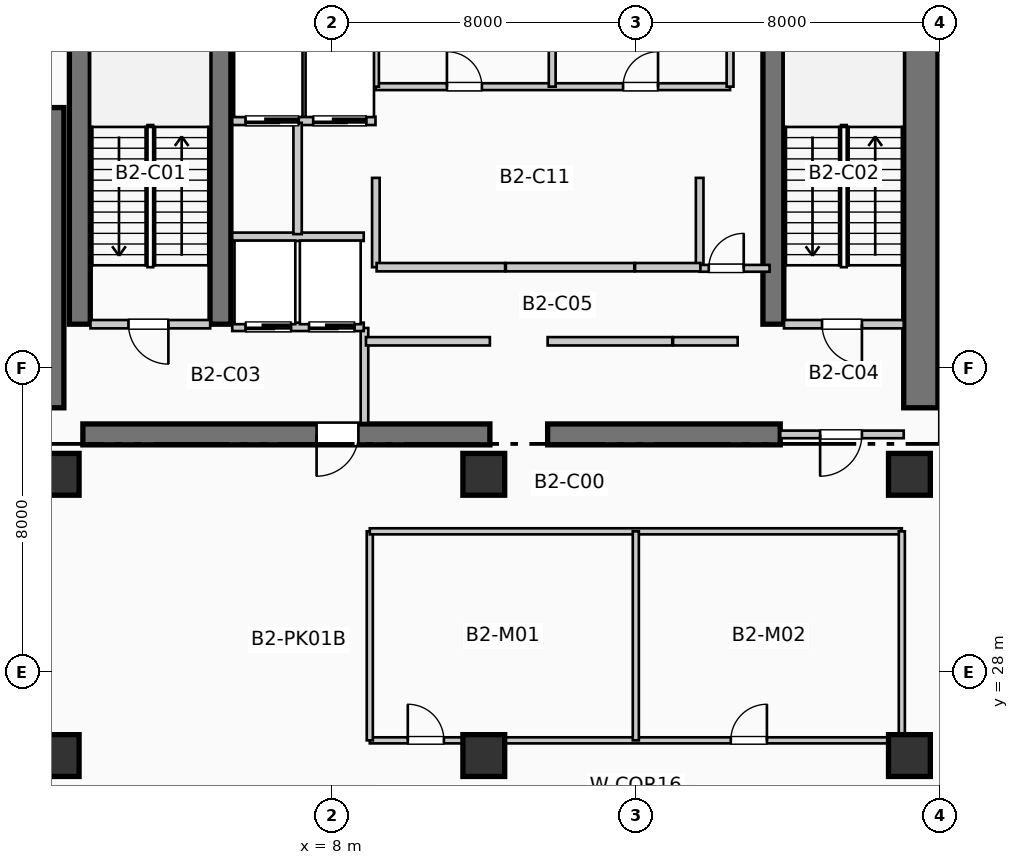
"""IFC4 building model, lengths in metres.
Left out: names, types, materials, properties, quantities, classifications, styles, units other than length and angle.
Written with IfcOpenShell. Run it as: python <this file> out.ifc"""

import sys

from ifc_helpers import new_model, si_unit, direction, frame, frame_2d, origin, origin_2d, place, context, subcontext, project, spatial, rectangle, extrude, element, fill, save


model = new_model("IFC4")
c1 = context("Model", 3, precision=1e-05, world=origin(), true_north=direction((0.0, 1.0)))
c2 = subcontext(c1, "Body", "Model", "MODEL_VIEW")
j1 = project(units=[si_unit("LENGTHUNIT", "METRE"), si_unit("PLANEANGLEUNIT", "RADIAN")], contexts=[c1])
p1 = place(None, origin())
s1 = spatial("IfcSite", under=j1, at=p1, CompositionType="ELEMENT")
p2 = place(p1, origin())
s2 = spatial("IfcBuilding", under=s1, at=p2, CompositionType="ELEMENT")
p3 = place(p2, frame((0.0, 0.0, -9.24)))
s3 = spatial("IfcBuildingStorey", under=s2, at=p3, CompositionType="ELEMENT", Elevation=-9.24)
p4 = place(p3, frame((0.5, 34.95, 0.0), z_axis=(0.0, 0.0, 1.0), x_axis=(0.0, 1.0, 0.0)))
e1 = element("IfcWall", 1, at=p4, inside=s3, PredefinedType="SHEAR", context=c2, shape_type="SweptSolid", body=[
    extrude(rectangle(XDim=7.9, YDim=0.9, at=frame_2d((3.95, 0.0))), origin(), (0.0, 0.0, 1.0), 4.62),
])
p5 = place(p3, frame((23.5, 34.95, 0.0), z_axis=(0.0, 0.0, 1.0), x_axis=(0.0, 1.0, 0.0)))
e2 = element("IfcWall", 2, at=p5, inside=s3, PredefinedType="SHEAR", context=c2, shape_type="SweptSolid", body=[
    extrude(rectangle(XDim=10.64, YDim=0.9, at=frame_2d((5.32, 0.0))), origin(), (0.0, 0.0, 1.0), 4.62),
])
p6 = place(p3, frame((1.45, 34.25, 0.0), z_axis=(0.0, 0.0, 1.0), x_axis=(1.0, 0.0, 0.0)))
e3 = element("IfcWall", 3, at=p6, inside=s3, PredefinedType="SHEAR", context=c2, shape_type="SweptSolid", body=[
    extrude(rectangle(XDim=10.71, YDim=0.55, at=frame_2d((5.355, 0.0))), origin(), (0.0, 0.0, 1.0), 4.62),
])
p7 = place(p6, frame((7.25, 0.0, 0.0), z_axis=(0.0, 0.0, 1.0), x_axis=(-1.0, 0.0, 0.0)))
e4 = element("IfcOpeningElement", 4, at=p7, cuts=e3, PredefinedType="OPENING", context=c2, shape_type="SweptSolid", body=[
    extrude(rectangle(XDim=1.1, YDim=2.15, at=frame_2d((0.55, 1.075))), frame((0.0, 0.285, 0.0), z_axis=(0.0, -1.0, 0.0), x_axis=(1.0, 0.0, 0.0)), (0.0, 0.0, 1.0), 0.57),
])
p8 = place(p3, frame((13.68, 34.25, 0.0), z_axis=(0.0, 0.0, 1.0), x_axis=(1.0, 0.0, 0.0)))
e5 = element("IfcWall", 5, at=p8, inside=s3, PredefinedType="SHEAR", context=c2, shape_type="SweptSolid", body=[
    extrude(rectangle(XDim=6.12, YDim=0.55, at=frame_2d((3.06, 0.0))), origin(), (0.0, 0.0, 1.0), 4.62),
])
for number, where, z_axis, x_axis in (
    (6, (1.37, 37.15, 0.0), (0.0, 0.0, 1.0), (0.0, 1.0, 0.0)),
    (7, (5.07, 37.15, 0.0), (0.0, 0.0, 1.0), (0.0, 1.0, 0.0)),
    (8, (19.62, 37.15, 0.0), (0.0, 0.0, 1.0), (0.0, 1.0, 0.0)),
):
    element("IfcWall", number, at=place(p3, frame(where, z_axis=z_axis, x_axis=x_axis)), inside=s3, PredefinedType="SHEAR", context=c2, shape_type="SweptSolid", body=[
        extrude(rectangle(XDim=7.89, YDim=0.55, at=frame_2d((3.945, 0.0))), origin(), (0.0, 0.0, 1.0), 4.62),
    ])
for number, where, z_axis, x_axis in (
    (9, (0.8, 25.8, 0.0), (0.0, 0.0, 1.0), (1.0, 0.0, 0.0)),
    (10, (0.8, 33.2, 0.0), (0.0, 0.0, 1.0), (1.0, 0.0, 0.0)),
    (11, (12.0, 25.8, 0.0), (0.0, 0.0, 1.0), (1.0, 0.0, 0.0)),
    (12, (12.0, 33.2, 0.0), (0.0, 0.0, 1.0), (1.0, 0.0, 0.0)),
    (13, (23.2, 25.8, 0.0), (0.0, 0.0, 1.0), (1.0, 0.0, 0.0)),
    (14, (23.2, 33.2, 0.0), (0.0, 0.0, 1.0), (1.0, 0.0, 0.0)),
):
    element("IfcColumn", number, at=place(p3, frame(where, z_axis=z_axis, x_axis=x_axis)), inside=s3, PredefinedType="COLUMN", context=c2, shape_type="SweptSolid", body=[
        extrude(rectangle(XDim=1.1, YDim=1.1, at=origin_2d()), origin(), (0.0, 0.0, 1.0), 4.62),
    ])
p9 = place(p3, frame((1.65, 37.15, 0.0), z_axis=(0.0, 0.0, 1.0), x_axis=(1.0, 0.0, 0.0)))
e15 = element("IfcWall", 15, at=p9, inside=s3, PredefinedType="PARTITIONING", context=c2, shape_type="SweptSolid", body=[
    extrude(rectangle(XDim=3.15, YDim=0.22, at=frame_2d((1.575, 0.0))), origin(), (0.0, 0.0, 1.0), 4.27),
])
p10 = place(p9, frame((2.05, 0.0, 0.0), z_axis=(0.0, 0.0, 1.0), x_axis=(-1.0, 0.0, 0.0)))
e16 = element("IfcOpeningElement", 16, at=p10, cuts=e15, PredefinedType="OPENING", context=c2, shape_type="SweptSolid", body=[
    extrude(rectangle(XDim=1.05, YDim=2.15, at=frame_2d((0.525, 1.075))), frame((0.0, 0.12, 0.0), z_axis=(0.0, -1.0, 0.0), x_axis=(1.0, 0.0, 0.0)), (0.0, 0.0, 1.0), 0.24),
])
p11 = place(p3, frame((8.86, 34.55, 0.0), z_axis=(0.0, 0.0, 1.0), x_axis=(0.0, 1.0, 0.0)))
e17 = element("IfcWall", 17, at=p11, inside=s3, PredefinedType="PARTITIONING", context=c2, shape_type="SweptSolid", body=[
    extrude(rectangle(XDim=2.5, YDim=0.2, at=frame_2d((1.25, 0.0))), origin(), (0.0, 0.0, 1.0), 4.27),
])
p12 = place(p3, frame((19.9, 37.15, 0.0), z_axis=(0.0, 0.0, 1.0), x_axis=(1.0, 0.0, 0.0)))
e18 = element("IfcWall", 18, at=p12, inside=s3, PredefinedType="PARTITIONING", context=c2, shape_type="SweptSolid", body=[
    extrude(rectangle(XDim=3.15, YDim=0.22, at=frame_2d((1.575, 0.0))), origin(), (0.0, 0.0, 1.0), 4.27),
])
p13 = place(p12, frame((2.05, 0.0, 0.0), z_axis=(0.0, 0.0, 1.0), x_axis=(-1.0, 0.0, 0.0)))
e19 = element("IfcOpeningElement", 19, at=p13, cuts=e18, PredefinedType="OPENING", context=c2, shape_type="SweptSolid", body=[
    extrude(rectangle(XDim=1.05, YDim=2.15, at=frame_2d((0.525, 1.075))), frame((0.0, 0.12, 0.0), z_axis=(0.0, -1.0, 0.0), x_axis=(1.0, 0.0, 0.0)), (0.0, 0.0, 1.0), 0.24),
])
p14 = place(p3, frame((19.8, 34.25, 0.0), z_axis=(0.0, 0.0, 1.0), x_axis=(1.0, 0.0, 0.0)))
e20 = element("IfcWall", 20, at=p14, inside=s3, PredefinedType="PARTITIONING", context=c2, shape_type="SweptSolid", body=[
    extrude(rectangle(XDim=3.25, YDim=0.2, at=frame_2d((1.625, 0.0))), origin(), (0.0, 0.0, 1.0), 4.27),
])
p15 = place(p14, frame((2.15, 0.0, 0.0), z_axis=(0.0, 0.0, 1.0), x_axis=(-1.0, 0.0, 0.0)))
e21 = element("IfcOpeningElement", 21, at=p15, cuts=e20, PredefinedType="OPENING", context=c2, shape_type="SweptSolid", body=[
    extrude(rectangle(XDim=1.1, YDim=2.15, at=frame_2d((0.55, 1.075))), frame((0.0, 0.11, 0.0), z_axis=(0.0, -1.0, 0.0), x_axis=(1.0, 0.0, 0.0)), (0.0, 0.0, 1.0), 0.22),
])
p16 = place(p3, frame((5.38, 37.08, 0.0), z_axis=(0.0, 0.0, 1.0), x_axis=(1.0, 0.0, 0.0)))
e22 = element("IfcWall", 22, at=p16, inside=s3, PredefinedType="PARTITIONING", context=c2, shape_type="SweptSolid", body=[
    extrude(rectangle(XDim=3.46, YDim=0.22, at=frame_2d((1.73, 0.0))), origin(), (0.0, 0.0, 1.0), 4.27),
])
p17 = place(p16, frame((1.55, 0.0, 0.0), z_axis=(0.0, 0.0, 1.0), x_axis=(-1.0, 0.0, 0.0)))
e23 = element("IfcOpeningElement", 23, at=p17, cuts=e22, PredefinedType="OPENING", context=c2, shape_type="SweptSolid", body=[
    extrude(rectangle(XDim=1.2, YDim=2.2, at=frame_2d((0.6, 1.1))), frame((0.0, 0.12, 0.0), z_axis=(0.0, -1.0, 0.0), x_axis=(1.0, 0.0, 0.0)), (0.0, 0.0, 1.0), 0.24),
])
p18 = place(p16, frame((3.22, 0.0, 0.0), z_axis=(0.0, 0.0, 1.0), x_axis=(-1.0, 0.0, 0.0)))
e24 = element("IfcOpeningElement", 24, at=p18, cuts=e22, PredefinedType="OPENING", context=c2, shape_type="SweptSolid", body=[
    extrude(rectangle(XDim=1.2, YDim=2.2, at=frame_2d((0.6, 1.1))), frame((0.0, 0.12, 0.0), z_axis=(0.0, -1.0, 0.0), x_axis=(1.0, 0.0, 0.0)), (0.0, 0.0, 1.0), 0.24),
])
p19 = place(p3, frame((5.38, 39.45, 0.0), z_axis=(0.0, 0.0, 1.0), x_axis=(1.0, 0.0, 0.0)))
e25 = element("IfcWall", 25, at=p19, inside=s3, PredefinedType="PARTITIONING", context=c2, shape_type="SweptSolid", body=[
    extrude(rectangle(XDim=3.46, YDim=0.22, at=frame_2d((1.73, 0.0))), origin(), (0.0, 0.0, 1.0), 4.27),
])
p20 = place(p3, frame((5.38, 42.5, 0.0), z_axis=(0.0, 0.0, 1.0), x_axis=(1.0, 0.0, 0.0)))
e26 = element("IfcWall", 26, at=p20, inside=s3, PredefinedType="PARTITIONING", context=c2, shape_type="SweptSolid", body=[
    extrude(rectangle(XDim=3.77, YDim=0.22, at=frame_2d((1.885, 0.0))), origin(), (0.0, 0.0, 1.0), 4.27),
])
p21 = place(p20, frame((1.75, 0.0, 0.0), z_axis=(0.0, 0.0, 1.0), x_axis=(-1.0, 0.0, 0.0)))
e27 = element("IfcOpeningElement", 27, at=p21, cuts=e26, PredefinedType="OPENING", context=c2, shape_type="SweptSolid", body=[
    extrude(rectangle(XDim=1.4, YDim=2.2, at=frame_2d((0.7, 1.1))), frame((0.0, 0.12, 0.0), z_axis=(0.0, -1.0, 0.0), x_axis=(1.0, 0.0, 0.0)), (0.0, 0.0, 1.0), 0.24),
])
p22 = place(p20, frame((3.53, 0.0, 0.0), z_axis=(0.0, 0.0, 1.0), x_axis=(-1.0, 0.0, 0.0)))
e28 = element("IfcOpeningElement", 28, at=p22, cuts=e26, PredefinedType="OPENING", context=c2, shape_type="SweptSolid", body=[
    extrude(rectangle(XDim=1.4, YDim=2.2, at=frame_2d((0.7, 1.1))), frame((0.0, 0.12, 0.0), z_axis=(0.0, -1.0, 0.0), x_axis=(1.0, 0.0, 0.0)), (0.0, 0.0, 1.0), 0.24),
])
p23 = place(p3, frame((7.1, 39.52, 0.0), z_axis=(0.0, 0.0, 1.0), x_axis=(0.0, 1.0, 0.0)))
e29 = element("IfcWall", 29, at=p23, inside=s3, PredefinedType="PARTITIONING", context=c2, shape_type="SweptSolid", body=[
    extrude(rectangle(XDim=2.93, YDim=0.22, at=frame_2d((1.465, 0.0))), origin(), (0.0, 0.0, 1.0), 4.27),
])
for number, where, z_axis, x_axis in (
    (30, (9.16, 38.65, 0.0), (0.0, 0.0, 1.0), (0.0, 1.0, 0.0)),
    (31, (17.68, 38.65, 0.0), (0.0, 0.0, 1.0), (0.0, 1.0, 0.0)),
):
    element("IfcWall", number, at=place(p3, frame(where, z_axis=z_axis, x_axis=x_axis)), inside=s3, PredefinedType="PARTITIONING", context=c2, shape_type="SweptSolid", body=[
        extrude(rectangle(XDim=2.35, YDim=0.2, at=frame_2d((1.175, 0.0))), origin(), (0.0, 0.0, 1.0), 4.27),
    ])
p24 = place(p3, frame((17.68, 38.62, 0.0), z_axis=(0.0, 0.0, 1.0), x_axis=(1.0, 0.0, 0.0)))
e32 = element("IfcWall", 32, at=p24, inside=s3, PredefinedType="PARTITIONING", context=c2, shape_type="SweptSolid", body=[
    extrude(rectangle(XDim=1.84, YDim=0.18, at=frame_2d((0.92, 0.0))), origin(), (0.0, 0.0, 1.0), 4.27),
])
p25 = place(p24, frame((0.24, 0.0, 0.0)))
e33 = element("IfcOpeningElement", 33, at=p25, cuts=e32, PredefinedType="OPENING", context=c2, shape_type="SweptSolid", body=[
    extrude(rectangle(XDim=0.92, YDim=2.1, at=frame_2d((0.46, 1.05))), frame((0.0, 0.1, 0.0), z_axis=(0.0, -1.0, 0.0), x_axis=(1.0, 0.0, 0.0)), (0.0, 0.0, 1.0), 0.2),
])
p26 = place(p3, frame((8.9, 36.7, 0.0), z_axis=(0.0, 0.0, 1.0), x_axis=(1.0, 0.0, 0.0)))
e34 = element("IfcWall", 34, at=p26, inside=s3, PredefinedType="PARTITIONING", context=c2, shape_type="SweptSolid", body=[
    extrude(rectangle(XDim=3.26, YDim=0.22, at=frame_2d((1.63, 0.0))), origin(), (0.0, 0.0, 1.0), 4.27),
])
p27 = place(p3, frame((9.18, 38.65, 0.0), z_axis=(0.0, 0.0, 1.0), x_axis=(1.0, 0.0, 0.0)))
e35 = element("IfcWall", 35, at=p27, inside=s3, PredefinedType="PARTITIONING", context=c2, shape_type="SweptSolid", body=[
    extrude(rectangle(XDim=3.38, YDim=0.22, at=frame_2d((1.69, 0.0))), origin(), (0.0, 0.0, 1.0), 4.27),
])
p28 = place(p3, frame((13.68, 36.7, 0.0), z_axis=(0.0, 0.0, 1.0), x_axis=(1.0, 0.0, 0.0)))
e36 = element("IfcWall", 36, at=p28, inside=s3, PredefinedType="PARTITIONING", context=c2, shape_type="SweptSolid", body=[
    extrude(rectangle(XDim=3.28, YDim=0.22, at=frame_2d((1.64, 0.0))), origin(), (0.0, 0.0, 1.0), 4.27),
])
p29 = place(p3, frame((12.58, 38.65, 0.0), z_axis=(0.0, 0.0, 1.0), x_axis=(1.0, 0.0, 0.0)))
e37 = element("IfcWall", 37, at=p29, inside=s3, PredefinedType="PARTITIONING", context=c2, shape_type="SweptSolid", body=[
    extrude(rectangle(XDim=3.38, YDim=0.22, at=frame_2d((1.69, 0.0))), origin(), (0.0, 0.0, 1.0), 4.27),
])
p30 = place(p3, frame((16.98, 36.7, 0.0), z_axis=(0.0, 0.0, 1.0), x_axis=(1.0, 0.0, 0.0)))
e38 = element("IfcWall", 38, at=p30, inside=s3, PredefinedType="PARTITIONING", context=c2, shape_type="SweptSolid", body=[
    extrude(rectangle(XDim=1.7, YDim=0.22, at=frame_2d((0.85, 0.0))), origin(), (0.0, 0.0, 1.0), 4.27),
])
p31 = place(p3, frame((15.98, 38.65, 0.0), z_axis=(0.0, 0.0, 1.0), x_axis=(1.0, 0.0, 0.0)))
e39 = element("IfcWall", 39, at=p31, inside=s3, PredefinedType="PARTITIONING", context=c2, shape_type="SweptSolid", body=[
    extrude(rectangle(XDim=1.72, YDim=0.22, at=frame_2d((0.86, 0.0))), origin(), (0.0, 0.0, 1.0), 4.27),
])
p32 = place(p3, frame((9.15, 43.4, 0.0), z_axis=(0.0, 0.0, 1.0), x_axis=(1.0, 0.0, 0.0)))
e40 = element("IfcWall", 40, at=p32, inside=s3, PredefinedType="PLUMBINGWALL", context=c2, shape_type="SweptSolid", body=[
    extrude(rectangle(XDim=9.33, YDim=0.18, at=frame_2d((4.665, 0.0))), origin(), (0.0, 0.0, 1.0), 4.27),
])
p33 = place(p32, frame((1.88, 0.0, 0.0)))
e41 = element("IfcOpeningElement", 41, at=p33, cuts=e40, PredefinedType="OPENING", context=c2, shape_type="SweptSolid", body=[
    extrude(rectangle(XDim=0.92, YDim=2.1, at=frame_2d((0.46, 1.05))), frame((0.0, 0.1, 0.0), z_axis=(0.0, -1.0, 0.0), x_axis=(1.0, 0.0, 0.0)), (0.0, 0.0, 1.0), 0.2),
])
p34 = place(p32, frame((6.515, 0.0, 0.0)))
e42 = element("IfcOpeningElement", 42, at=p34, cuts=e40, PredefinedType="OPENING", context=c2, shape_type="SweptSolid", body=[
    extrude(rectangle(XDim=0.92, YDim=2.1, at=frame_2d((0.46, 1.05))), frame((0.0, 0.1, 0.0), z_axis=(0.0, -1.0, 0.0), x_axis=(1.0, 0.0, 0.0)), (0.0, 0.0, 1.0), 0.2),
])
for number, where, z_axis, x_axis in (
    (43, (9.15, 43.4, 0.0), (0.0, 0.0, 1.0), (0.0, 1.0, 0.0)),
    (44, (18.48, 43.4, 0.0), (0.0, 0.0, 1.0), (0.0, 1.0, 0.0)),
    (45, (13.8, 43.4, 0.0), (0.0, 0.0, 1.0), (0.0, 1.0, 0.0)),
):
    element("IfcWall", number, at=place(p3, frame(where, z_axis=z_axis, x_axis=x_axis)), inside=s3, PredefinedType="PLUMBINGWALL", context=c2, shape_type="SweptSolid", body=[
        extrude(rectangle(XDim=1.88, YDim=0.18, at=frame_2d((0.94, 0.0))), origin(), (0.0, 0.0, 1.0), 4.27),
    ])
p35 = place(p3, frame((9.0, 26.2, 0.0), z_axis=(0.0, 0.0, 1.0), x_axis=(1.0, 0.0, 0.0)))
e46 = element("IfcWall", 46, at=p35, inside=s3, PredefinedType="PARTITIONING", context=c2, shape_type="SweptSolid", body=[
    extrude(rectangle(XDim=14.0, YDim=0.16, at=frame_2d((7.0, 0.0))), origin(), (0.0, 0.0, 1.0), 3.455),
])
p36 = place(p35, frame((1.0, 0.0, 0.0)))
e47 = element("IfcOpeningElement", 47, at=p36, cuts=e46, PredefinedType="OPENING", context=c2, shape_type="SweptSolid", body=[
    extrude(rectangle(XDim=0.95, YDim=2.1, at=frame_2d((0.475, 1.05))), frame((0.0, 0.09, 0.0), z_axis=(0.0, -1.0, 0.0), x_axis=(1.0, 0.0, 0.0)), (0.0, 0.0, 1.0), 0.18),
])
p37 = place(p35, frame((9.5, 0.0, 0.0)))
e48 = element("IfcOpeningElement", 48, at=p37, cuts=e46, PredefinedType="OPENING", context=c2, shape_type="SweptSolid", body=[
    extrude(rectangle(XDim=0.95, YDim=2.1, at=frame_2d((0.475, 1.05))), frame((0.0, 0.09, 0.0), z_axis=(0.0, -1.0, 0.0), x_axis=(1.0, 0.0, 0.0)), (0.0, 0.0, 1.0), 0.18),
])
p38 = place(p3, frame((9.0, 26.2, 0.0), z_axis=(0.0, 0.0, 1.0), x_axis=(0.0, 1.0, 0.0)))
e49 = element("IfcWall", 49, at=p38, inside=s3, PredefinedType="PARTITIONING", context=c2, shape_type="SweptSolid", body=[
    extrude(rectangle(XDim=5.5, YDim=0.16, at=frame_2d((2.75, 0.0))), origin(), (0.0, 0.0, 1.0), 4.27),
])
p39 = place(p3, frame((9.0, 31.7, 0.0), z_axis=(0.0, 0.0, 1.0), x_axis=(1.0, 0.0, 0.0)))
e50 = element("IfcWall", 50, at=p39, inside=s3, PredefinedType="PARTITIONING", context=c2, shape_type="SweptSolid", body=[
    extrude(rectangle(XDim=14.0, YDim=0.16, at=frame_2d((7.0, 0.0))), origin(), (0.0, 0.0, 1.0), 4.27),
])
p40 = place(p3, frame((23.0, 26.2, 0.0), z_axis=(0.0, 0.0, 1.0), x_axis=(0.0, 1.0, 0.0)))
e51 = element("IfcWall", 51, at=p40, inside=s3, PredefinedType="PARTITIONING", context=c2, shape_type="SweptSolid", body=[
    extrude(rectangle(XDim=5.5, YDim=0.16, at=frame_2d((2.75, 0.0))), origin(), (0.0, 0.0, 1.0), 3.455),
])
p41 = place(p3, frame((16.0, 26.2, 0.0), z_axis=(0.0, 0.0, 1.0), x_axis=(0.0, 1.0, 0.0)))
e52 = element("IfcWall", 52, at=p41, inside=s3, PredefinedType="PARTITIONING", context=c2, shape_type="SweptSolid", body=[
    extrude(rectangle(XDim=5.5, YDim=0.16, at=frame_2d((2.75, 0.0))), origin(), (0.0, 0.0, 1.0), 4.27),
])
p42 = place(p10, origin())
e53 = element("IfcDoor", 53, at=p42, inside=s3, OperationType="SINGLE_SWING_RIGHT", PredefinedType="DOOR", context=c2, shape_type="SweptSolid", body=[
    extrude(rectangle(XDim=1.05, YDim=2.15, at=frame_2d((0.525, 1.075))), frame((0.0, 0.025, 0.0), z_axis=(0.0, -1.0, 0.0), x_axis=(1.0, 0.0, 0.0)), (0.0, 0.0, 1.0), 0.05),
])
fill(e16, e53)
p43 = place(p7, origin())
e54 = element("IfcDoor", 54, at=p43, inside=s3, OperationType="SINGLE_SWING_LEFT", PredefinedType="DOOR", context=c2, shape_type="SweptSolid", body=[
    extrude(rectangle(XDim=1.1, YDim=2.15, at=frame_2d((0.55, 1.075))), frame((0.0, 0.025, 0.0), z_axis=(0.0, -1.0, 0.0), x_axis=(1.0, 0.0, 0.0)), (0.0, 0.0, 1.0), 0.05),
])
fill(e4, e54)
p44 = place(p13, origin())
e55 = element("IfcDoor", 55, at=p44, inside=s3, OperationType="SINGLE_SWING_RIGHT", PredefinedType="DOOR", context=c2, shape_type="SweptSolid", body=[
    extrude(rectangle(XDim=1.05, YDim=2.15, at=frame_2d((0.525, 1.075))), frame((0.0, 0.025, 0.0), z_axis=(0.0, -1.0, 0.0), x_axis=(1.0, 0.0, 0.0)), (0.0, 0.0, 1.0), 0.05),
])
fill(e19, e55)
p45 = place(p15, origin())
e56 = element("IfcDoor", 56, at=p45, inside=s3, OperationType="SINGLE_SWING_LEFT", PredefinedType="DOOR", context=c2, shape_type="SweptSolid", body=[
    extrude(rectangle(XDim=1.1, YDim=2.15, at=frame_2d((0.55, 1.075))), frame((0.0, 0.025, 0.0), z_axis=(0.0, -1.0, 0.0), x_axis=(1.0, 0.0, 0.0)), (0.0, 0.0, 1.0), 0.05),
])
fill(e21, e56)
p46 = place(p17, origin())
e57 = element("IfcDoor", 57, at=p46, inside=s3, OperationType="SLIDING_TO_RIGHT", PredefinedType="DOOR", context=c2, shape_type="SweptSolid", body=[
    extrude(rectangle(XDim=1.2, YDim=2.2, at=frame_2d((0.6, 1.1))), frame((0.0, 0.025, 0.0), z_axis=(0.0, -1.0, 0.0), x_axis=(1.0, 0.0, 0.0)), (0.0, 0.0, 1.0), 0.05),
])
fill(e23, e57)
p47 = place(p18, origin())
e58 = element("IfcDoor", 58, at=p47, inside=s3, OperationType="SLIDING_TO_RIGHT", PredefinedType="DOOR", context=c2, shape_type="SweptSolid", body=[
    extrude(rectangle(XDim=1.2, YDim=2.2, at=frame_2d((0.6, 1.1))), frame((0.0, 0.025, 0.0), z_axis=(0.0, -1.0, 0.0), x_axis=(1.0, 0.0, 0.0)), (0.0, 0.0, 1.0), 0.05),
])
fill(e24, e58)
p48 = place(p21, origin())
e59 = element("IfcDoor", 59, at=p48, inside=s3, OperationType="SLIDING_TO_LEFT", PredefinedType="DOOR", context=c2, shape_type="SweptSolid", body=[
    extrude(rectangle(XDim=1.4, YDim=2.2, at=frame_2d((0.7, 1.1))), frame((0.0, 0.025, 0.0), z_axis=(0.0, -1.0, 0.0), x_axis=(1.0, 0.0, 0.0)), (0.0, 0.0, 1.0), 0.05),
])
fill(e27, e59)
p49 = place(p22, origin())
e60 = element("IfcDoor", 60, at=p49, inside=s3, OperationType="SLIDING_TO_LEFT", PredefinedType="DOOR", context=c2, shape_type="SweptSolid", body=[
    extrude(rectangle(XDim=1.4, YDim=2.2, at=frame_2d((0.7, 1.1))), frame((0.0, 0.025, 0.0), z_axis=(0.0, -1.0, 0.0), x_axis=(1.0, 0.0, 0.0)), (0.0, 0.0, 1.0), 0.05),
])
fill(e28, e60)
p50 = place(p25, origin())
e61 = element("IfcDoor", 61, at=p50, inside=s3, OperationType="SINGLE_SWING_RIGHT", PredefinedType="DOOR", context=c2, shape_type="SweptSolid", body=[
    extrude(rectangle(XDim=0.92, YDim=2.1, at=frame_2d((0.46, 1.05))), frame((0.0, 0.025, 0.0), z_axis=(0.0, -1.0, 0.0), x_axis=(1.0, 0.0, 0.0)), (0.0, 0.0, 1.0), 0.05),
])
fill(e33, e61)
p51 = place(p33, origin())
e62 = element("IfcDoor", 62, at=p51, inside=s3, OperationType="SINGLE_SWING_LEFT", PredefinedType="DOOR", context=c2, shape_type="SweptSolid", body=[
    extrude(rectangle(XDim=0.92, YDim=2.1, at=frame_2d((0.46, 1.05))), frame((0.0, 0.025, 0.0), z_axis=(0.0, -1.0, 0.0), x_axis=(1.0, 0.0, 0.0)), (0.0, 0.0, 1.0), 0.05),
])
fill(e41, e62)
p52 = place(p34, origin())
e63 = element("IfcDoor", 63, at=p52, inside=s3, OperationType="SINGLE_SWING_RIGHT", PredefinedType="DOOR", context=c2, shape_type="SweptSolid", body=[
    extrude(rectangle(XDim=0.92, YDim=2.1, at=frame_2d((0.46, 1.05))), frame((0.0, 0.025, 0.0), z_axis=(0.0, -1.0, 0.0), x_axis=(1.0, 0.0, 0.0)), (0.0, 0.0, 1.0), 0.05),
])
fill(e42, e63)
p53 = place(p36, origin())
e64 = element("IfcDoor", 64, at=p53, inside=s3, OperationType="SINGLE_SWING_LEFT", PredefinedType="DOOR", context=c2, shape_type="SweptSolid", body=[
    extrude(rectangle(XDim=0.95, YDim=2.1, at=frame_2d((0.475, 1.05))), frame((0.0, 0.025, 0.0), z_axis=(0.0, -1.0, 0.0), x_axis=(1.0, 0.0, 0.0)), (0.0, 0.0, 1.0), 0.05),
])
fill(e47, e64)
p54 = place(p37, origin())
e65 = element("IfcDoor", 65, at=p54, inside=s3, OperationType="SINGLE_SWING_RIGHT", PredefinedType="DOOR", context=c2, shape_type="SweptSolid", body=[
    extrude(rectangle(XDim=0.95, YDim=2.1, at=frame_2d((0.475, 1.05))), frame((0.0, 0.025, 0.0), z_axis=(0.0, -1.0, 0.0), x_axis=(1.0, 0.0, 0.0)), (0.0, 0.0, 1.0), 0.05),
])
fill(e48, e65)
save(model, sys.argv[1])
